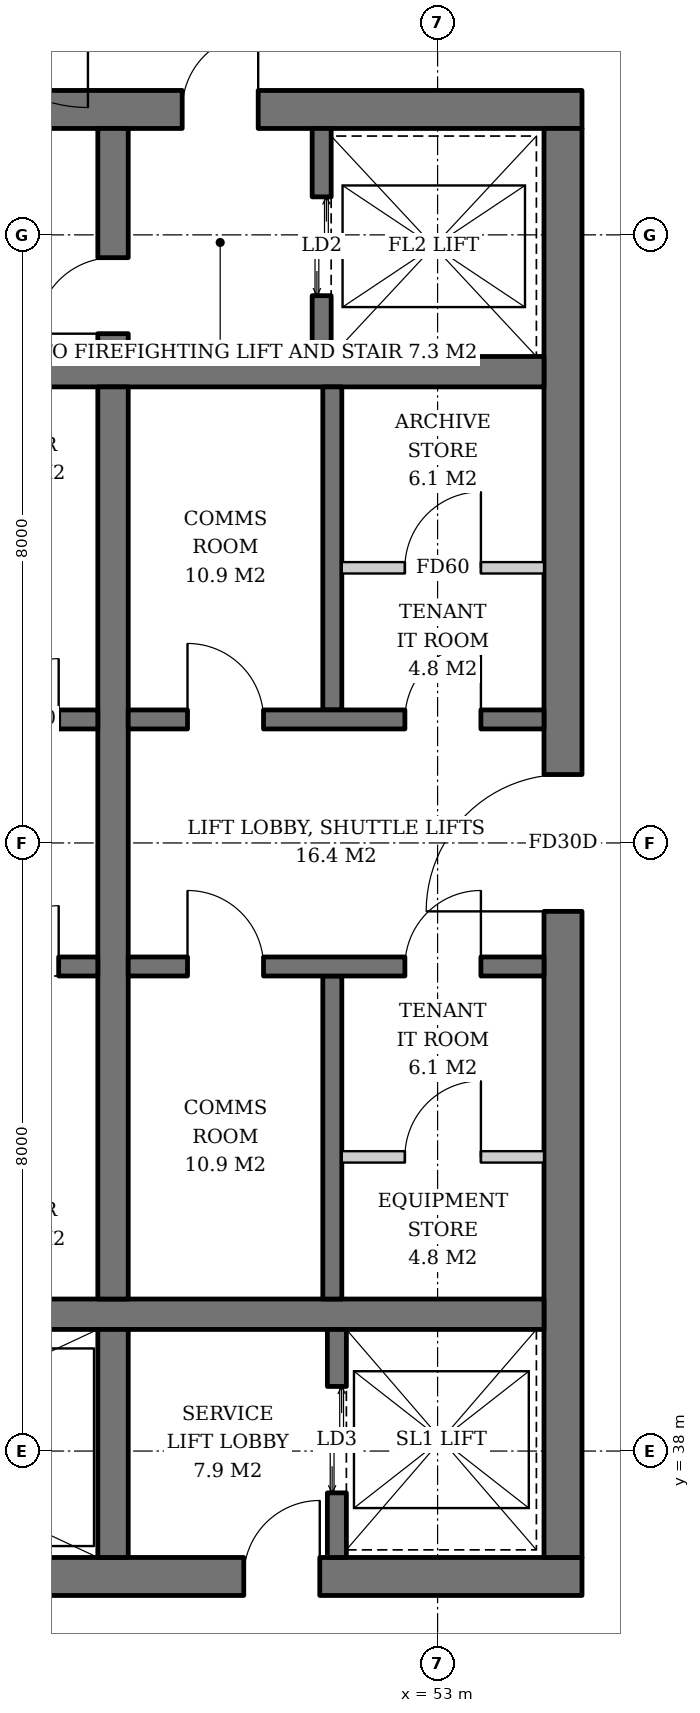
"""IFC4 building model, lengths in metres.
Left out: names, types, materials, properties, quantities, classifications, styles, units other than length and angle.
Written with IfcOpenShell. Run it as: python <this file> out.ifc"""

import sys

from ifc_helpers import new_model, si_unit, direction, frame, frame_2d, origin, place, context, subcontext, project, spatial, rectangle, extrude, element, fill, save


model = new_model("IFC4")
c1 = context("Model", 3, precision=1e-05, world=origin(), true_north=direction((0.0, 1.0)))
c2 = subcontext(c1, "Body", "Model", "MODEL_VIEW")
j1 = project(units=[si_unit("LENGTHUNIT", "METRE"), si_unit("PLANEANGLEUNIT", "RADIAN")], contexts=[c1])
p1 = place(None, origin())
s1 = spatial("IfcSite", under=j1, at=p1, CompositionType="ELEMENT")
p2 = place(p1, origin())
s2 = spatial("IfcBuilding", under=s1, at=p2, CompositionType="ELEMENT")
p3 = place(p2, frame((0.0, 0.0, 245.2)))
s3 = spatial("IfcBuildingStorey", under=s2, at=p3, CompositionType="ELEMENT", Elevation=245.2)
p4 = place(p3, frame((35.1, 36.35, 0.0), z_axis=(0.0, 0.0, 1.0), x_axis=(1.0, 0.0, 0.0)))
e1 = element("IfcWall", 1, at=p4, inside=s3, PredefinedType="SHEAR", context=c2, shape_type="SweptSolid", body=[
    extrude(rectangle(XDim=19.8, YDim=0.5, at=frame_2d((9.9, 0.0))), origin(), (0.0, 0.0, 1.0), 3.8),
])
p5 = place(p4, frame((3.9, 0.0, 0.0)))
e2 = element("IfcOpeningElement", 2, at=p5, cuts=e1, PredefinedType="OPENING", context=c2, shape_type="SweptSolid", body=[
    extrude(rectangle(XDim=1.0, YDim=2.1, at=frame_2d((0.5, 1.05))), frame((0.0, 0.26, 0.0), z_axis=(0.0, -1.0, 0.0), x_axis=(1.0, 0.0, 0.0)), (0.0, 0.0, 1.0), 0.52),
])
p6 = place(p4, frame((15.35, 0.0, 0.0)))
e3 = element("IfcOpeningElement", 3, at=p6, cuts=e1, PredefinedType="OPENING", context=c2, shape_type="SweptSolid", body=[
    extrude(rectangle(XDim=1.0, YDim=2.1, at=frame_2d((0.5, 1.05))), frame((0.0, 0.26, 0.0), z_axis=(0.0, -1.0, 0.0), x_axis=(1.0, 0.0, 0.0)), (0.0, 0.0, 1.0), 0.52),
])
p7 = place(p3, frame((35.1, 55.65, 0.0), z_axis=(0.0, 0.0, 1.0), x_axis=(1.0, 0.0, 0.0)))
e4 = element("IfcWall", 4, at=p7, inside=s3, PredefinedType="SHEAR", context=c2, shape_type="SweptSolid", body=[
    extrude(rectangle(XDim=19.8, YDim=0.5, at=frame_2d((9.9, 0.0))), origin(), (0.0, 0.0, 1.0), 3.8),
])
p8 = place(p7, frame((14.54, 0.0, 0.0)))
e5 = element("IfcOpeningElement", 5, at=p8, cuts=e4, PredefinedType="OPENING", context=c2, shape_type="SweptSolid", body=[
    extrude(rectangle(XDim=1.0, YDim=2.1, at=frame_2d((0.5, 1.05))), frame((0.0, 0.26, 0.0), z_axis=(0.0, -1.0, 0.0), x_axis=(1.0, 0.0, 0.0)), (0.0, 0.0, 1.0), 0.52),
])
p9 = place(p7, frame((0.96, 0.0, 0.0)))
e6 = element("IfcOpeningElement", 6, at=p9, cuts=e4, PredefinedType="OPENING", context=c2, shape_type="SweptSolid", body=[
    extrude(rectangle(XDim=1.0, YDim=2.1, at=frame_2d((0.5, 1.05))), frame((0.0, 0.26, 0.0), z_axis=(0.0, -1.0, 0.0), x_axis=(1.0, 0.0, 0.0)), (0.0, 0.0, 1.0), 0.52),
])
p10 = place(p7, frame((3.23, 0.0, 0.0)))
e7 = element("IfcOpeningElement", 7, at=p10, cuts=e4, PredefinedType="OPENING", context=c2, shape_type="SweptSolid", body=[
    extrude(rectangle(XDim=1.0, YDim=2.1, at=frame_2d((0.5, 1.05))), frame((0.0, 0.26, 0.0), z_axis=(0.0, -1.0, 0.0), x_axis=(1.0, 0.0, 0.0)), (0.0, 0.0, 1.0), 0.52),
])
p11 = place(p3, frame((54.65, 36.6, 0.0), z_axis=(0.0, 0.0, 1.0), x_axis=(0.0, 1.0, 0.0)))
e8 = element("IfcWall", 8, at=p11, inside=s3, PredefinedType="SHEAR", context=c2, shape_type="SweptSolid", body=[
    extrude(rectangle(XDim=18.8, YDim=0.5, at=frame_2d((9.4, 0.0))), origin(), (0.0, 0.0, 1.0), 3.8),
])
p12 = place(p11, frame((8.5, 0.0, 0.0)))
e9 = element("IfcOpeningElement", 9, at=p12, cuts=e8, PredefinedType="OPENING", context=c2, shape_type="SweptSolid", body=[
    extrude(rectangle(XDim=1.8, YDim=2.4, at=frame_2d((0.9, 1.2))), frame((0.0, 0.26, 0.0), z_axis=(0.0, -1.0, 0.0), x_axis=(1.0, 0.0, 0.0)), (0.0, 0.0, 1.0), 0.52),
])
for number, where, z_axis, x_axis in (
    (10, (35.6, 39.8, 0.0), (0.0, 0.0, 1.0), (1.0, 0.0, 0.0)),
    (11, (35.6, 52.2, 0.0), (0.0, 0.0, 1.0), (1.0, 0.0, 0.0)),
):
    element("IfcWall", number, at=place(p3, frame(where, z_axis=z_axis, x_axis=x_axis)), inside=s3, PredefinedType="SHEAR", context=c2, shape_type="SweptSolid", body=[
        extrude(rectangle(XDim=18.8, YDim=0.4, at=frame_2d((9.4, 0.0))), origin(), (0.0, 0.0, 1.0), 3.8),
    ])
p13 = place(p3, frame((48.73, 36.6, 0.0), z_axis=(0.0, 0.0, 1.0), x_axis=(0.0, 1.0, 0.0)))
e12 = element("IfcWall", 12, at=p13, inside=s3, PredefinedType="SHEAR", context=c2, shape_type="SweptSolid", body=[
    extrude(rectangle(XDim=3.0, YDim=0.4, at=frame_2d((1.5, 0.0))), origin(), (0.0, 0.0, 1.0), 3.8),
])
p14 = place(p3, frame((48.73, 40.0, 0.0), z_axis=(0.0, 0.0, 1.0), x_axis=(0.0, 1.0, 0.0)))
e13 = element("IfcWall", 13, at=p14, inside=s3, PredefinedType="SHEAR", context=c2, shape_type="SweptSolid", body=[
    extrude(rectangle(XDim=12.0, YDim=0.4, at=frame_2d((6.0, 0.0))), origin(), (0.0, 0.0, 1.0), 3.8),
])
p15 = place(p3, frame((48.73, 52.4, 0.0), z_axis=(0.0, 0.0, 1.0), x_axis=(0.0, 1.0, 0.0)))
e14 = element("IfcWall", 14, at=p15, inside=s3, PredefinedType="SHEAR", context=c2, shape_type="SweptSolid", body=[
    extrude(rectangle(XDim=3.0, YDim=0.4, at=frame_2d((1.5, 0.0))), origin(), (0.0, 0.0, 1.0), 3.8),
])
p16 = place(p15, frame((0.3, 0.0, 0.0)))
e15 = element("IfcOpeningElement", 15, at=p16, cuts=e14, PredefinedType="OPENING", context=c2, shape_type="SweptSolid", body=[
    extrude(rectangle(XDim=1.0, YDim=2.1, at=frame_2d((0.5, 1.05))), frame((0.0, 0.21, 0.0), z_axis=(0.0, -1.0, 0.0), x_axis=(1.0, 0.0, 0.0)), (0.0, 0.0, 1.0), 0.42),
])
p17 = place(p3, frame((51.675, 36.6, 0.0), z_axis=(0.0, 0.0, 1.0), x_axis=(0.0, 1.0, 0.0)))
e16 = element("IfcWall", 16, at=p17, inside=s3, PredefinedType="SHEAR", context=c2, shape_type="SweptSolid", body=[
    extrude(rectangle(XDim=3.0, YDim=0.25, at=frame_2d((1.5, 0.0))), origin(), (0.0, 0.0, 1.0), 3.8),
])
p18 = place(p17, frame((0.85, 0.0, 0.0)))
e17 = element("IfcOpeningElement", 17, at=p18, cuts=e16, PredefinedType="OPENING", context=c2, shape_type="SweptSolid", body=[
    extrude(rectangle(XDim=1.4, YDim=2.4, at=frame_2d((0.7, 1.2))), frame((0.0, 0.135, 0.0), z_axis=(0.0, -1.0, 0.0), x_axis=(1.0, 0.0, 0.0)), (0.0, 0.0, 1.0), 0.27),
])
p19 = place(p3, frame((51.475, 52.4, 0.0), z_axis=(0.0, 0.0, 1.0), x_axis=(0.0, 1.0, 0.0)))
e18 = element("IfcWall", 18, at=p19, inside=s3, PredefinedType="SHEAR", context=c2, shape_type="SweptSolid", body=[
    extrude(rectangle(XDim=3.0, YDim=0.25, at=frame_2d((1.5, 0.0))), origin(), (0.0, 0.0, 1.0), 3.8),
])
p20 = place(p19, frame((0.8, 0.0, 0.0)))
e19 = element("IfcOpeningElement", 19, at=p20, cuts=e18, PredefinedType="OPENING", context=c2, shape_type="SweptSolid", body=[
    extrude(rectangle(XDim=1.3, YDim=2.2, at=frame_2d((0.65, 1.1))), frame((0.0, 0.135, 0.0), z_axis=(0.0, -1.0, 0.0), x_axis=(1.0, 0.0, 0.0)), (0.0, 0.0, 1.0), 0.27),
])
p21 = place(p3, frame((35.6, 47.625, 0.0), z_axis=(0.0, 0.0, 1.0), x_axis=(1.0, 0.0, 0.0)))
e20 = element("IfcWall", 20, at=p21, inside=s3, PredefinedType="SHEAR", context=c2, shape_type="SweptSolid", body=[
    extrude(rectangle(XDim=12.93, YDim=0.25, at=frame_2d((6.465, 0.0))), origin(), (0.0, 0.0, 1.0), 3.8),
])
p22 = place(p21, frame((0.75, 0.0, 0.0)))
e21 = element("IfcOpeningElement", 21, at=p22, cuts=e20, PredefinedType="OPENING", context=c2, shape_type="SweptSolid", body=[
    extrude(rectangle(XDim=1.1, YDim=2.2, at=frame_2d((0.55, 1.1))), frame((0.0, 0.135, 0.0), z_axis=(0.0, -1.0, 0.0), x_axis=(1.0, 0.0, 0.0)), (0.0, 0.0, 1.0), 0.27),
])
p23 = place(p21, frame((3.55, 0.0, 0.0)))
e22 = element("IfcOpeningElement", 22, at=p23, cuts=e20, PredefinedType="OPENING", context=c2, shape_type="SweptSolid", body=[
    extrude(rectangle(XDim=1.1, YDim=2.2, at=frame_2d((0.55, 1.1))), frame((0.0, 0.135, 0.0), z_axis=(0.0, -1.0, 0.0), x_axis=(1.0, 0.0, 0.0)), (0.0, 0.0, 1.0), 0.27),
])
p24 = place(p21, frame((6.3, 0.0, 0.0)))
e23 = element("IfcOpeningElement", 23, at=p24, cuts=e20, PredefinedType="OPENING", context=c2, shape_type="SweptSolid", body=[
    extrude(rectangle(XDim=1.1, YDim=2.2, at=frame_2d((0.55, 1.1))), frame((0.0, 0.135, 0.0), z_axis=(0.0, -1.0, 0.0), x_axis=(1.0, 0.0, 0.0)), (0.0, 0.0, 1.0), 0.27),
])
p25 = place(p21, frame((9.1, 0.0, 0.0)))
e24 = element("IfcOpeningElement", 24, at=p25, cuts=e20, PredefinedType="OPENING", context=c2, shape_type="SweptSolid", body=[
    extrude(rectangle(XDim=1.0, YDim=2.1, at=frame_2d((0.5, 1.05))), frame((0.0, 0.135, 0.0), z_axis=(0.0, -1.0, 0.0), x_axis=(1.0, 0.0, 0.0)), (0.0, 0.0, 1.0), 0.27),
])
p26 = place(p21, frame((11.615, 0.0, 0.0)))
e25 = element("IfcOpeningElement", 25, at=p26, cuts=e20, PredefinedType="OPENING", context=c2, shape_type="SweptSolid", body=[
    extrude(rectangle(XDim=0.8, YDim=2.0, at=frame_2d((0.4, 1.0))), frame((0.0, 0.135, 0.0), z_axis=(0.0, -1.0, 0.0), x_axis=(1.0, 0.0, 0.0)), (0.0, 0.0, 1.0), 0.27),
])
p27 = place(p3, frame((35.6, 44.375, 0.0), z_axis=(0.0, 0.0, 1.0), x_axis=(1.0, 0.0, 0.0)))
e26 = element("IfcWall", 26, at=p27, inside=s3, PredefinedType="SHEAR", context=c2, shape_type="SweptSolid", body=[
    extrude(rectangle(XDim=12.93, YDim=0.25, at=frame_2d((6.465, 0.0))), origin(), (0.0, 0.0, 1.0), 3.8),
])
p28 = place(p27, frame((0.75, 0.0, 0.0)))
e27 = element("IfcOpeningElement", 27, at=p28, cuts=e26, PredefinedType="OPENING", context=c2, shape_type="SweptSolid", body=[
    extrude(rectangle(XDim=1.1, YDim=2.2, at=frame_2d((0.55, 1.1))), frame((0.0, 0.135, 0.0), z_axis=(0.0, -1.0, 0.0), x_axis=(1.0, 0.0, 0.0)), (0.0, 0.0, 1.0), 0.27),
])
p29 = place(p27, frame((3.55, 0.0, 0.0)))
e28 = element("IfcOpeningElement", 28, at=p29, cuts=e26, PredefinedType="OPENING", context=c2, shape_type="SweptSolid", body=[
    extrude(rectangle(XDim=1.1, YDim=2.2, at=frame_2d((0.55, 1.1))), frame((0.0, 0.135, 0.0), z_axis=(0.0, -1.0, 0.0), x_axis=(1.0, 0.0, 0.0)), (0.0, 0.0, 1.0), 0.27),
])
p30 = place(p27, frame((6.3, 0.0, 0.0)))
e29 = element("IfcOpeningElement", 29, at=p30, cuts=e26, PredefinedType="OPENING", context=c2, shape_type="SweptSolid", body=[
    extrude(rectangle(XDim=1.1, YDim=2.2, at=frame_2d((0.55, 1.1))), frame((0.0, 0.135, 0.0), z_axis=(0.0, -1.0, 0.0), x_axis=(1.0, 0.0, 0.0)), (0.0, 0.0, 1.0), 0.27),
])
p31 = place(p27, frame((9.1, 0.0, 0.0)))
e30 = element("IfcOpeningElement", 30, at=p31, cuts=e26, PredefinedType="OPENING", context=c2, shape_type="SweptSolid", body=[
    extrude(rectangle(XDim=1.0, YDim=2.1, at=frame_2d((0.5, 1.05))), frame((0.0, 0.135, 0.0), z_axis=(0.0, -1.0, 0.0), x_axis=(1.0, 0.0, 0.0)), (0.0, 0.0, 1.0), 0.27),
])
p32 = place(p27, frame((11.615, 0.0, 0.0)))
e31 = element("IfcOpeningElement", 31, at=p32, cuts=e26, PredefinedType="OPENING", context=c2, shape_type="SweptSolid", body=[
    extrude(rectangle(XDim=0.8, YDim=2.0, at=frame_2d((0.4, 1.0))), frame((0.0, 0.135, 0.0), z_axis=(0.0, -1.0, 0.0), x_axis=(1.0, 0.0, 0.0)), (0.0, 0.0, 1.0), 0.27),
])
p33 = place(p3, frame((51.615, 47.75, 0.0), z_axis=(0.0, 0.0, 1.0), x_axis=(0.0, 1.0, 0.0)))
e32 = element("IfcWall", 32, at=p33, inside=s3, PredefinedType="SHEAR", context=c2, shape_type="SweptSolid", body=[
    extrude(rectangle(XDim=4.25, YDim=0.25, at=frame_2d((2.125, 0.0))), origin(), (0.0, 0.0, 1.0), 3.8),
])
p34 = place(p3, frame((48.93, 47.625, 0.0), z_axis=(0.0, 0.0, 1.0), x_axis=(1.0, 0.0, 0.0)))
e33 = element("IfcWall", 33, at=p34, inside=s3, PredefinedType="SHEAR", context=c2, shape_type="SweptSolid", body=[
    extrude(rectangle(XDim=5.47, YDim=0.25, at=frame_2d((2.735, 0.0))), origin(), (0.0, 0.0, 1.0), 3.8),
])
p35 = place(p34, frame((0.78, 0.0, 0.0)))
e34 = element("IfcOpeningElement", 34, at=p35, cuts=e33, PredefinedType="OPENING", context=c2, shape_type="SweptSolid", body=[
    extrude(rectangle(XDim=1.0, YDim=2.1, at=frame_2d((0.5, 1.05))), frame((0.0, 0.135, 0.0), z_axis=(0.0, -1.0, 0.0), x_axis=(1.0, 0.0, 0.0)), (0.0, 0.0, 1.0), 0.27),
])
p36 = place(p34, frame((3.64, 0.0, 0.0)))
e35 = element("IfcOpeningElement", 35, at=p36, cuts=e33, PredefinedType="OPENING", context=c2, shape_type="SweptSolid", body=[
    extrude(rectangle(XDim=1.0, YDim=2.1, at=frame_2d((0.5, 1.05))), frame((0.0, 0.135, 0.0), z_axis=(0.0, -1.0, 0.0), x_axis=(1.0, 0.0, 0.0)), (0.0, 0.0, 1.0), 0.27),
])
p37 = place(p3, frame((51.615, 44.25, 0.0), z_axis=(0.0, 0.0, 1.0), x_axis=(0.0, -1.0, 0.0)))
e36 = element("IfcWall", 36, at=p37, inside=s3, PredefinedType="SHEAR", context=c2, shape_type="SweptSolid", body=[
    extrude(rectangle(XDim=4.25, YDim=0.25, at=frame_2d((2.125, 0.0))), origin(), (0.0, 0.0, 1.0), 3.8),
])
p38 = place(p3, frame((48.93, 44.375, 0.0), z_axis=(0.0, 0.0, 1.0), x_axis=(1.0, 0.0, 0.0)))
e37 = element("IfcWall", 37, at=p38, inside=s3, PredefinedType="SHEAR", context=c2, shape_type="SweptSolid", body=[
    extrude(rectangle(XDim=5.47, YDim=0.25, at=frame_2d((2.735, 0.0))), origin(), (0.0, 0.0, 1.0), 3.8),
])
p39 = place(p38, frame((0.78, 0.0, 0.0)))
e38 = element("IfcOpeningElement", 38, at=p39, cuts=e37, PredefinedType="OPENING", context=c2, shape_type="SweptSolid", body=[
    extrude(rectangle(XDim=1.0, YDim=2.1, at=frame_2d((0.5, 1.05))), frame((0.0, 0.135, 0.0), z_axis=(0.0, -1.0, 0.0), x_axis=(1.0, 0.0, 0.0)), (0.0, 0.0, 1.0), 0.27),
])
p40 = place(p38, frame((3.64, 0.0, 0.0)))
e39 = element("IfcOpeningElement", 39, at=p40, cuts=e37, PredefinedType="OPENING", context=c2, shape_type="SweptSolid", body=[
    extrude(rectangle(XDim=1.0, YDim=2.1, at=frame_2d((0.5, 1.05))), frame((0.0, 0.135, 0.0), z_axis=(0.0, -1.0, 0.0), x_axis=(1.0, 0.0, 0.0)), (0.0, 0.0, 1.0), 0.27),
])
p41 = place(p3, frame((51.74, 49.62, 0.0), z_axis=(0.0, 0.0, 1.0), x_axis=(1.0, 0.0, 0.0)))
e40 = element("IfcWall", 40, at=p41, inside=s3, PredefinedType="SOLIDWALL", context=c2, shape_type="SweptSolid", body=[
    extrude(rectangle(XDim=2.66, YDim=0.15, at=frame_2d((1.33, 0.0))), origin(), (0.0, 0.0, 1.0), 3.62),
])
p42 = place(p41, frame((0.83, 0.0, 0.0)))
e41 = element("IfcOpeningElement", 41, at=p42, cuts=e40, PredefinedType="OPENING", context=c2, shape_type="SweptSolid", body=[
    extrude(rectangle(XDim=1.0, YDim=2.1, at=frame_2d((0.5, 1.05))), frame((0.0, 0.085, 0.0), z_axis=(0.0, -1.0, 0.0), x_axis=(1.0, 0.0, 0.0)), (0.0, 0.0, 1.0), 0.17),
])
p43 = place(p3, frame((51.74, 41.87, 0.0), z_axis=(0.0, 0.0, 1.0), x_axis=(1.0, 0.0, 0.0)))
e42 = element("IfcWall", 42, at=p43, inside=s3, PredefinedType="SOLIDWALL", context=c2, shape_type="SweptSolid", body=[
    extrude(rectangle(XDim=2.66, YDim=0.15, at=frame_2d((1.33, 0.0))), origin(), (0.0, 0.0, 1.0), 3.62),
])
p44 = place(p43, frame((0.83, 0.0, 0.0)))
e43 = element("IfcOpeningElement", 43, at=p44, cuts=e42, PredefinedType="OPENING", context=c2, shape_type="SweptSolid", body=[
    extrude(rectangle(XDim=1.0, YDim=2.1, at=frame_2d((0.5, 1.05))), frame((0.0, 0.085, 0.0), z_axis=(0.0, -1.0, 0.0), x_axis=(1.0, 0.0, 0.0)), (0.0, 0.0, 1.0), 0.17),
])
p45 = place(p18, origin())
e44 = element("IfcDoor", 44, at=p45, inside=s3, OperationType="DOUBLE_DOOR_SLIDING", PredefinedType="DOOR", context=c2, shape_type="SweptSolid", body=[
    extrude(rectangle(XDim=1.4, YDim=2.4, at=frame_2d((0.7, 1.2))), frame((0.0, 0.025, 0.0), z_axis=(0.0, -1.0, 0.0), x_axis=(1.0, 0.0, 0.0)), (0.0, 0.0, 1.0), 0.05),
])
fill(e17, e44)
p46 = place(p20, origin())
e45 = element("IfcDoor", 45, at=p46, inside=s3, OperationType="DOUBLE_DOOR_SLIDING", PredefinedType="DOOR", context=c2, shape_type="SweptSolid", body=[
    extrude(rectangle(XDim=1.3, YDim=2.2, at=frame_2d((0.65, 1.1))), frame((0.0, 0.025, 0.0), z_axis=(0.0, -1.0, 0.0), x_axis=(1.0, 0.0, 0.0)), (0.0, 0.0, 1.0), 0.05),
])
fill(e19, e45)
p47 = place(p26, origin())
e46 = element("IfcDoor", 46, at=p47, inside=s3, OperationType="SINGLE_SWING_RIGHT", PredefinedType="DOOR", context=c2, shape_type="SweptSolid", body=[
    extrude(rectangle(XDim=0.8, YDim=2.0, at=frame_2d((0.4, 1.0))), frame((0.0, 0.025, 0.0), z_axis=(0.0, -1.0, 0.0), x_axis=(1.0, 0.0, 0.0)), (0.0, 0.0, 1.0), 0.05),
])
fill(e25, e46)
p48 = place(p32, origin())
e47 = element("IfcDoor", 47, at=p48, inside=s3, OperationType="SINGLE_SWING_RIGHT", PredefinedType="DOOR", context=c2, shape_type="SweptSolid", body=[
    extrude(rectangle(XDim=0.8, YDim=2.0, at=frame_2d((0.4, 1.0))), frame((0.0, 0.025, 0.0), z_axis=(0.0, -1.0, 0.0), x_axis=(1.0, 0.0, 0.0)), (0.0, 0.0, 1.0), 0.05),
])
fill(e31, e47)
p49 = place(p35, origin())
e48 = element("IfcDoor", 48, at=p49, inside=s3, OperationType="SINGLE_SWING_LEFT", PredefinedType="DOOR", context=c2, shape_type="SweptSolid", body=[
    extrude(rectangle(XDim=1.0, YDim=2.1, at=frame_2d((0.5, 1.05))), frame((0.0, 0.025, 0.0), z_axis=(0.0, -1.0, 0.0), x_axis=(1.0, 0.0, 0.0)), (0.0, 0.0, 1.0), 0.05),
])
fill(e34, e48)
p50 = place(p36, origin())
e49 = element("IfcDoor", 49, at=p50, inside=s3, OperationType="SINGLE_SWING_RIGHT", PredefinedType="DOOR", context=c2, shape_type="SweptSolid", body=[
    extrude(rectangle(XDim=1.0, YDim=2.1, at=frame_2d((0.5, 1.05))), frame((0.0, 0.025, 0.0), z_axis=(0.0, -1.0, 0.0), x_axis=(1.0, 0.0, 0.0)), (0.0, 0.0, 1.0), 0.05),
])
fill(e35, e49)
p51 = place(p39, origin())
e50 = element("IfcDoor", 50, at=p51, inside=s3, OperationType="SINGLE_SWING_LEFT", PredefinedType="DOOR", context=c2, shape_type="SweptSolid", body=[
    extrude(rectangle(XDim=1.0, YDim=2.1, at=frame_2d((0.5, 1.05))), frame((0.0, 0.025, 0.0), z_axis=(0.0, -1.0, 0.0), x_axis=(1.0, 0.0, 0.0)), (0.0, 0.0, 1.0), 0.05),
])
fill(e38, e50)
p52 = place(p40, origin())
e51 = element("IfcDoor", 51, at=p52, inside=s3, OperationType="SINGLE_SWING_RIGHT", PredefinedType="DOOR", context=c2, shape_type="SweptSolid", body=[
    extrude(rectangle(XDim=1.0, YDim=2.1, at=frame_2d((0.5, 1.05))), frame((0.0, 0.025, 0.0), z_axis=(0.0, -1.0, 0.0), x_axis=(1.0, 0.0, 0.0)), (0.0, 0.0, 1.0), 0.05),
])
fill(e39, e51)
p53 = place(p42, origin())
e52 = element("IfcDoor", 52, at=p53, inside=s3, OperationType="SINGLE_SWING_RIGHT", PredefinedType="DOOR", context=c2, shape_type="SweptSolid", body=[
    extrude(rectangle(XDim=1.0, YDim=2.1, at=frame_2d((0.5, 1.05))), frame((0.0, 0.025, 0.0), z_axis=(0.0, -1.0, 0.0), x_axis=(1.0, 0.0, 0.0)), (0.0, 0.0, 1.0), 0.05),
])
fill(e41, e52)
p54 = place(p44, origin())
e53 = element("IfcDoor", 53, at=p54, inside=s3, OperationType="SINGLE_SWING_RIGHT", PredefinedType="DOOR", context=c2, shape_type="SweptSolid", body=[
    extrude(rectangle(XDim=1.0, YDim=2.1, at=frame_2d((0.5, 1.05))), frame((0.0, 0.025, 0.0), z_axis=(0.0, -1.0, 0.0), x_axis=(1.0, 0.0, 0.0)), (0.0, 0.0, 1.0), 0.05),
])
fill(e43, e53)
p55 = place(p16, origin())
e54 = element("IfcDoor", 54, at=p55, inside=s3, OperationType="SINGLE_SWING_LEFT", PredefinedType="DOOR", context=c2, shape_type="SweptSolid", body=[
    extrude(rectangle(XDim=1.0, YDim=2.1, at=frame_2d((0.5, 1.05))), frame((0.0, 0.025, 0.0), z_axis=(0.0, -1.0, 0.0), x_axis=(1.0, 0.0, 0.0)), (0.0, 0.0, 1.0), 0.05),
])
fill(e15, e54)
p56 = place(p8, origin())
e55 = element("IfcDoor", 55, at=p56, inside=s3, OperationType="SINGLE_SWING_RIGHT", PredefinedType="DOOR", context=c2, shape_type="SweptSolid", body=[
    extrude(rectangle(XDim=1.0, YDim=2.1, at=frame_2d((0.5, 1.05))), frame((0.0, 0.025, 0.0), z_axis=(0.0, -1.0, 0.0), x_axis=(1.0, 0.0, 0.0)), (0.0, 0.0, 1.0), 0.05),
])
fill(e5, e55)
p57 = place(p12, origin())
e56 = element("IfcDoor", 56, at=p57, inside=s3, OperationType="DOUBLE_DOOR_SINGLE_SWING", PredefinedType="DOOR", context=c2, shape_type="SweptSolid", body=[
    extrude(rectangle(XDim=1.8, YDim=2.4, at=frame_2d((0.9, 1.2))), frame((0.0, 0.025, 0.0), z_axis=(0.0, -1.0, 0.0), x_axis=(1.0, 0.0, 0.0)), (0.0, 0.0, 1.0), 0.05),
])
fill(e9, e56)
p58 = place(p6, origin())
e57 = element("IfcDoor", 57, at=p58, inside=s3, OperationType="SINGLE_SWING_RIGHT", PredefinedType="DOOR", context=c2, shape_type="SweptSolid", body=[
    extrude(rectangle(XDim=1.0, YDim=2.1, at=frame_2d((0.5, 1.05))), frame((0.0, 0.025, 0.0), z_axis=(0.0, -1.0, 0.0), x_axis=(1.0, 0.0, 0.0)), (0.0, 0.0, 1.0), 0.05),
])
fill(e3, e57)
save(model, sys.argv[1])
